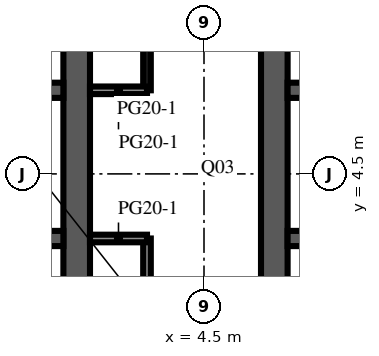
"""IFC4 building model, lengths in metres.
Left out: names, types, materials, properties, quantities, classifications, styles, units other than length and angle.
Written with IfcOpenShell. Run it as: python <this file> out.ifc"""

import sys

from ifc_helpers import new_model, si_unit, direction, frame, frame_2d, origin, place, context, subcontext, project, spatial, rectangle, extrude, element, fill, save


model = new_model("IFC4")
c1 = context("Model", 3, precision=1e-05, world=origin(), true_north=direction((0.0, 1.0)))
c2 = subcontext(c1, "Body", "Model", "MODEL_VIEW")
j1 = project(units=[si_unit("LENGTHUNIT", "METRE"), si_unit("PLANEANGLEUNIT", "RADIAN")], contexts=[c1])
p1 = place(None, origin())
s1 = spatial("IfcSite", under=j1, at=p1, CompositionType="ELEMENT")
p2 = place(p1, origin())
s2 = spatial("IfcBuilding", under=s1, at=p2, CompositionType="ELEMENT")
p3 = place(p2, frame((0.0, 0.0, 235.7)))
s3 = spatial("IfcBuildingStorey", under=s2, at=p3, CompositionType="ELEMENT", Elevation=235.7)
p4 = place(p3, frame((1.15, -9.0, 0.0), z_axis=(0.0, 0.0, 1.0), x_axis=(0.0, 1.0, 0.0)))
e1 = element("IfcWall", 1, at=p4, inside=s3, PredefinedType="SHEAR", context=c2, shape_type="SweptSolid", body=[
    extrude(rectangle(XDim=27.5, YDim=0.7, at=frame_2d((13.75, 0.0))), origin(), (0.0, 0.0, 1.0), 4.1),
])
p5 = place(p4, frame((12.55, 0.0, 0.0)))
e2 = element("IfcOpeningElement", 2, at=p5, cuts=e1, PredefinedType="OPENING", context=c2, shape_type="SweptSolid", body=[
    extrude(rectangle(XDim=2.4, YDim=2.4, at=frame_2d((1.2, 1.2))), frame((0.0, 0.36, 0.0), z_axis=(0.0, -1.0, 0.0), x_axis=(1.0, 0.0, 0.0)), (0.0, 0.0, 1.0), 0.72),
])
p6 = place(p4, frame((5.42, 0.0, 0.0)))
e3 = element("IfcOpeningElement", 3, at=p6, cuts=e1, PredefinedType="OPENING", context=c2, shape_type="SweptSolid", body=[
    extrude(rectangle(XDim=1.2, YDim=2.1, at=frame_2d((0.6, 1.05))), frame((0.0, 0.36, 0.0), z_axis=(0.0, -1.0, 0.0), x_axis=(1.0, 0.0, 0.0)), (0.0, 0.0, 1.0), 0.72),
])
p7 = place(p4, frame((19.46, 0.0, 0.0)))
e4 = element("IfcOpeningElement", 4, at=p7, cuts=e1, PredefinedType="OPENING", context=c2, shape_type="SweptSolid", body=[
    extrude(rectangle(XDim=1.0, YDim=2.1, at=frame_2d((0.5, 1.05))), frame((0.0, 0.36, 0.0), z_axis=(0.0, -1.0, 0.0), x_axis=(1.0, 0.0, 0.0)), (0.0, 0.0, 1.0), 0.72),
])
p8 = place(p4, frame((21.17, 0.0, 0.0)))
e5 = element("IfcOpeningElement", 5, at=p8, cuts=e1, PredefinedType="OPENING", context=c2, shape_type="SweptSolid", body=[
    extrude(rectangle(XDim=1.0, YDim=2.1, at=frame_2d((0.5, 1.05))), frame((0.0, 0.36, 0.0), z_axis=(0.0, -1.0, 0.0), x_axis=(1.0, 0.0, 0.0)), (0.0, 0.0, 1.0), 0.72),
])
p9 = place(p4, frame((23.26, 0.0, 0.0)))
e6 = element("IfcOpeningElement", 6, at=p9, cuts=e1, PredefinedType="OPENING", context=c2, shape_type="SweptSolid", body=[
    extrude(rectangle(XDim=1.0, YDim=2.1, at=frame_2d((0.5, 1.05))), frame((0.0, 0.36, 0.0), z_axis=(0.0, -1.0, 0.0), x_axis=(1.0, 0.0, 0.0)), (0.0, 0.0, 1.0), 0.72),
])
p10 = place(p4, frame((25.35, 0.0, 0.0)))
e7 = element("IfcOpeningElement", 7, at=p10, cuts=e1, PredefinedType="OPENING", context=c2, shape_type="SweptSolid", body=[
    extrude(rectangle(XDim=1.0, YDim=2.1, at=frame_2d((0.5, 1.05))), frame((0.0, 0.36, 0.0), z_axis=(0.0, -1.0, 0.0), x_axis=(1.0, 0.0, 0.0)), (0.0, 0.0, 1.0), 0.72),
])
p11 = place(p3, frame((-9.8, 2.8, 0.0), z_axis=(0.0, 0.0, 1.0), x_axis=(1.0, 0.0, 0.0)))
e8 = element("IfcWall", 8, at=p11, inside=s3, PredefinedType="SHEAR", context=c2, shape_type="SweptSolid", body=[
    extrude(rectangle(XDim=10.6, YDim=0.4, at=frame_2d((5.3, 0.0))), origin(), (0.0, 0.0, 1.0), 4.1),
])
p12 = place(p11, frame((0.688, 0.0, 0.0)))
e9 = element("IfcOpeningElement", 9, at=p12, cuts=e8, PredefinedType="OPENING", context=c2, shape_type="SweptSolid", body=[
    extrude(rectangle(XDim=1.1, YDim=2.1, at=frame_2d((0.55, 1.05))), frame((0.0, 0.21, 0.0), z_axis=(0.0, -1.0, 0.0), x_axis=(1.0, 0.0, 0.0)), (0.0, 0.0, 1.0), 0.42),
])
p13 = place(p11, frame((3.438, 0.0, 0.0)))
e10 = element("IfcOpeningElement", 10, at=p13, cuts=e8, PredefinedType="OPENING", context=c2, shape_type="SweptSolid", body=[
    extrude(rectangle(XDim=1.1, YDim=2.1, at=frame_2d((0.55, 1.05))), frame((0.0, 0.21, 0.0), z_axis=(0.0, -1.0, 0.0), x_axis=(1.0, 0.0, 0.0)), (0.0, 0.0, 1.0), 0.42),
])
p14 = place(p11, frame((6.113, 0.0, 0.0)))
e11 = element("IfcOpeningElement", 11, at=p14, cuts=e8, PredefinedType="OPENING", context=c2, shape_type="SweptSolid", body=[
    extrude(rectangle(XDim=1.0, YDim=2.1, at=frame_2d((0.5, 1.05))), frame((0.0, 0.21, 0.0), z_axis=(0.0, -1.0, 0.0), x_axis=(1.0, 0.0, 0.0)), (0.0, 0.0, 1.0), 0.42),
])
p15 = place(p11, frame((8.863, 0.0, 0.0)))
e12 = element("IfcOpeningElement", 12, at=p15, cuts=e8, PredefinedType="OPENING", context=c2, shape_type="SweptSolid", body=[
    extrude(rectangle(XDim=1.0, YDim=2.1, at=frame_2d((0.5, 1.05))), frame((0.0, 0.21, 0.0), z_axis=(0.0, -1.0, 0.0), x_axis=(1.0, 0.0, 0.0)), (0.0, 0.0, 1.0), 0.42),
])
p16 = place(p3, frame((-9.8, 6.7, 0.0), z_axis=(0.0, 0.0, 1.0), x_axis=(1.0, 0.0, 0.0)))
e13 = element("IfcWall", 13, at=p16, inside=s3, PredefinedType="SHEAR", context=c2, shape_type="SweptSolid", body=[
    extrude(rectangle(XDim=10.6, YDim=0.4, at=frame_2d((5.3, 0.0))), origin(), (0.0, 0.0, 1.0), 4.1),
])
p17 = place(p16, frame((3.438, 0.0, 0.0)))
e14 = element("IfcOpeningElement", 14, at=p17, cuts=e13, PredefinedType="OPENING", context=c2, shape_type="SweptSolid", body=[
    extrude(rectangle(XDim=1.1, YDim=2.1, at=frame_2d((0.55, 1.05))), frame((0.0, 0.21, 0.0), z_axis=(0.0, -1.0, 0.0), x_axis=(1.0, 0.0, 0.0)), (0.0, 0.0, 1.0), 0.42),
])
p18 = place(p16, frame((6.062, 0.0, 0.0)))
e15 = element("IfcOpeningElement", 15, at=p18, cuts=e13, PredefinedType="OPENING", context=c2, shape_type="SweptSolid", body=[
    extrude(rectangle(XDim=1.1, YDim=2.1, at=frame_2d((0.55, 1.05))), frame((0.0, 0.21, 0.0), z_axis=(0.0, -1.0, 0.0), x_axis=(1.0, 0.0, 0.0)), (0.0, 0.0, 1.0), 0.42),
])
p19 = place(p16, frame((8.812, 0.0, 0.0)))
e16 = element("IfcOpeningElement", 16, at=p19, cuts=e13, PredefinedType="OPENING", context=c2, shape_type="SweptSolid", body=[
    extrude(rectangle(XDim=1.1, YDim=2.1, at=frame_2d((0.55, 1.05))), frame((0.0, 0.21, 0.0), z_axis=(0.0, -1.0, 0.0), x_axis=(1.0, 0.0, 0.0)), (0.0, 0.0, 1.0), 0.42),
])
p20 = place(p16, frame((0.738, 0.0, 0.0)))
e17 = element("IfcOpeningElement", 17, at=p20, cuts=e13, PredefinedType="OPENING", context=c2, shape_type="SweptSolid", body=[
    extrude(rectangle(XDim=1.0, YDim=2.1, at=frame_2d((0.5, 1.05))), frame((0.0, 0.21, 0.0), z_axis=(0.0, -1.0, 0.0), x_axis=(1.0, 0.0, 0.0)), (0.0, 0.0, 1.0), 0.42),
])
p21 = place(p3, frame((6.35, -9.0, 0.0), z_axis=(0.0, 0.0, 1.0), x_axis=(0.0, 1.0, 0.0)))
e18 = element("IfcWall", 18, at=p21, inside=s3, PredefinedType="SHEAR", context=c2, shape_type="SweptSolid", body=[
    extrude(rectangle(XDim=27.5, YDim=0.7, at=frame_2d((13.75, 0.0))), origin(), (0.0, 0.0, 1.0), 4.1),
])
p22 = place(p21, frame((12.55, 0.0, 0.0)))
e19 = element("IfcOpeningElement", 19, at=p22, cuts=e18, PredefinedType="OPENING", context=c2, shape_type="SweptSolid", body=[
    extrude(rectangle(XDim=2.4, YDim=2.4, at=frame_2d((1.2, 1.2))), frame((0.0, 0.36, 0.0), z_axis=(0.0, -1.0, 0.0), x_axis=(1.0, 0.0, 0.0)), (0.0, 0.0, 1.0), 0.72),
])
p23 = place(p21, frame((5.42, 0.0, 0.0)))
e20 = element("IfcOpeningElement", 20, at=p23, cuts=e18, PredefinedType="OPENING", context=c2, shape_type="SweptSolid", body=[
    extrude(rectangle(XDim=1.2, YDim=2.1, at=frame_2d((0.6, 1.05))), frame((0.0, 0.36, 0.0), z_axis=(0.0, -1.0, 0.0), x_axis=(1.0, 0.0, 0.0)), (0.0, 0.0, 1.0), 0.72),
])
p24 = place(p21, frame((19.46, 0.0, 0.0)))
e21 = element("IfcOpeningElement", 21, at=p24, cuts=e18, PredefinedType="OPENING", context=c2, shape_type="SweptSolid", body=[
    extrude(rectangle(XDim=1.0, YDim=2.1, at=frame_2d((0.5, 1.05))), frame((0.0, 0.36, 0.0), z_axis=(0.0, -1.0, 0.0), x_axis=(1.0, 0.0, 0.0)), (0.0, 0.0, 1.0), 0.72),
])
p25 = place(p21, frame((21.17, 0.0, 0.0)))
e22 = element("IfcOpeningElement", 22, at=p25, cuts=e18, PredefinedType="OPENING", context=c2, shape_type="SweptSolid", body=[
    extrude(rectangle(XDim=1.0, YDim=2.1, at=frame_2d((0.5, 1.05))), frame((0.0, 0.36, 0.0), z_axis=(0.0, -1.0, 0.0), x_axis=(1.0, 0.0, 0.0)), (0.0, 0.0, 1.0), 0.72),
])
p26 = place(p21, frame((23.26, 0.0, 0.0)))
e23 = element("IfcOpeningElement", 23, at=p26, cuts=e18, PredefinedType="OPENING", context=c2, shape_type="SweptSolid", body=[
    extrude(rectangle(XDim=1.0, YDim=2.1, at=frame_2d((0.5, 1.05))), frame((0.0, 0.36, 0.0), z_axis=(0.0, -1.0, 0.0), x_axis=(1.0, 0.0, 0.0)), (0.0, 0.0, 1.0), 0.72),
])
p27 = place(p21, frame((25.35, 0.0, 0.0)))
e24 = element("IfcOpeningElement", 24, at=p27, cuts=e18, PredefinedType="OPENING", context=c2, shape_type="SweptSolid", body=[
    extrude(rectangle(XDim=1.0, YDim=2.1, at=frame_2d((0.5, 1.05))), frame((0.0, 0.36, 0.0), z_axis=(0.0, -1.0, 0.0), x_axis=(1.0, 0.0, 0.0)), (0.0, 0.0, 1.0), 0.72),
])
p28 = place(p3, frame((6.7, 2.8, 0.0), z_axis=(0.0, 0.0, 1.0), x_axis=(1.0, 0.0, 0.0)))
e25 = element("IfcWall", 25, at=p28, inside=s3, PredefinedType="SHEAR", context=c2, shape_type="SweptSolid", body=[
    extrude(rectangle(XDim=10.6, YDim=0.4, at=frame_2d((5.3, 0.0))), origin(), (0.0, 0.0, 1.0), 4.1),
])
p29 = place(p28, frame((0.688, 0.0, 0.0)))
e26 = element("IfcOpeningElement", 26, at=p29, cuts=e25, PredefinedType="OPENING", context=c2, shape_type="SweptSolid", body=[
    extrude(rectangle(XDim=1.1, YDim=2.1, at=frame_2d((0.55, 1.05))), frame((0.0, 0.21, 0.0), z_axis=(0.0, -1.0, 0.0), x_axis=(1.0, 0.0, 0.0)), (0.0, 0.0, 1.0), 0.42),
])
p30 = place(p28, frame((3.438, 0.0, 0.0)))
e27 = element("IfcOpeningElement", 27, at=p30, cuts=e25, PredefinedType="OPENING", context=c2, shape_type="SweptSolid", body=[
    extrude(rectangle(XDim=1.1, YDim=2.1, at=frame_2d((0.55, 1.05))), frame((0.0, 0.21, 0.0), z_axis=(0.0, -1.0, 0.0), x_axis=(1.0, 0.0, 0.0)), (0.0, 0.0, 1.0), 0.42),
])
p31 = place(p28, frame((6.113, 0.0, 0.0)))
e28 = element("IfcOpeningElement", 28, at=p31, cuts=e25, PredefinedType="OPENING", context=c2, shape_type="SweptSolid", body=[
    extrude(rectangle(XDim=1.0, YDim=2.1, at=frame_2d((0.5, 1.05))), frame((0.0, 0.21, 0.0), z_axis=(0.0, -1.0, 0.0), x_axis=(1.0, 0.0, 0.0)), (0.0, 0.0, 1.0), 0.42),
])
p32 = place(p28, frame((8.863, 0.0, 0.0)))
e29 = element("IfcOpeningElement", 29, at=p32, cuts=e25, PredefinedType="OPENING", context=c2, shape_type="SweptSolid", body=[
    extrude(rectangle(XDim=1.0, YDim=2.1, at=frame_2d((0.5, 1.05))), frame((0.0, 0.21, 0.0), z_axis=(0.0, -1.0, 0.0), x_axis=(1.0, 0.0, 0.0)), (0.0, 0.0, 1.0), 0.42),
])
p33 = place(p3, frame((6.7, 6.7, 0.0), z_axis=(0.0, 0.0, 1.0), x_axis=(1.0, 0.0, 0.0)))
e30 = element("IfcWall", 30, at=p33, inside=s3, PredefinedType="SHEAR", context=c2, shape_type="SweptSolid", body=[
    extrude(rectangle(XDim=10.6, YDim=0.4, at=frame_2d((5.3, 0.0))), origin(), (0.0, 0.0, 1.0), 4.1),
])
p34 = place(p33, frame((3.438, 0.0, 0.0)))
e31 = element("IfcOpeningElement", 31, at=p34, cuts=e30, PredefinedType="OPENING", context=c2, shape_type="SweptSolid", body=[
    extrude(rectangle(XDim=1.1, YDim=2.1, at=frame_2d((0.55, 1.05))), frame((0.0, 0.21, 0.0), z_axis=(0.0, -1.0, 0.0), x_axis=(1.0, 0.0, 0.0)), (0.0, 0.0, 1.0), 0.42),
])
p35 = place(p33, frame((6.062, 0.0, 0.0)))
e32 = element("IfcOpeningElement", 32, at=p35, cuts=e30, PredefinedType="OPENING", context=c2, shape_type="SweptSolid", body=[
    extrude(rectangle(XDim=1.1, YDim=2.1, at=frame_2d((0.55, 1.05))), frame((0.0, 0.21, 0.0), z_axis=(0.0, -1.0, 0.0), x_axis=(1.0, 0.0, 0.0)), (0.0, 0.0, 1.0), 0.42),
])
p36 = place(p33, frame((8.812, 0.0, 0.0)))
e33 = element("IfcOpeningElement", 33, at=p36, cuts=e30, PredefinedType="OPENING", context=c2, shape_type="SweptSolid", body=[
    extrude(rectangle(XDim=1.1, YDim=2.1, at=frame_2d((0.55, 1.05))), frame((0.0, 0.21, 0.0), z_axis=(0.0, -1.0, 0.0), x_axis=(1.0, 0.0, 0.0)), (0.0, 0.0, 1.0), 0.42),
])
p37 = place(p33, frame((0.738, 0.0, 0.0)))
e34 = element("IfcOpeningElement", 34, at=p37, cuts=e30, PredefinedType="OPENING", context=c2, shape_type="SweptSolid", body=[
    extrude(rectangle(XDim=1.0, YDim=2.1, at=frame_2d((0.5, 1.05))), frame((0.0, 0.21, 0.0), z_axis=(0.0, -1.0, 0.0), x_axis=(1.0, 0.0, 0.0)), (0.0, 0.0, 1.0), 0.42),
])
p38 = place(p3, frame((3.0, -2.0, 0.0), z_axis=(0.0, 0.0, 1.0), x_axis=(0.0, 1.0, 0.0)))
e35 = element("IfcWall", 35, at=p38, inside=s3, PredefinedType="PARTITIONING", context=c2, shape_type="SweptSolid", body=[
    extrude(rectangle(XDim=4.8, YDim=0.2, at=frame_2d((2.4, 0.0))), origin(), (0.0, 0.0, 1.0), 3.65),
])
p39 = place(p38, frame((2.35, 0.0, 0.0)))
e36 = element("IfcOpeningElement", 36, at=p39, cuts=e35, PredefinedType="OPENING", context=c2, shape_type="SweptSolid", body=[
    extrude(rectangle(XDim=1.0, YDim=2.1, at=frame_2d((0.5, 1.05))), frame((0.0, 0.11, 0.0), z_axis=(0.0, -1.0, 0.0), x_axis=(1.0, 0.0, 0.0)), (0.0, 0.0, 1.0), 0.22),
])
p40 = place(p3, frame((3.0, 6.7, 0.0), z_axis=(0.0, 0.0, 1.0), x_axis=(0.0, 1.0, 0.0)))
e37 = element("IfcWall", 37, at=p40, inside=s3, PredefinedType="PARTITIONING", context=c2, shape_type="SweptSolid", body=[
    extrude(rectangle(XDim=11.8, YDim=0.2, at=frame_2d((5.9, 0.0))), origin(), (0.0, 0.0, 1.0), 3.65),
])
p41 = place(p40, frame((6.6, 0.0, 0.0)))
e38 = element("IfcOpeningElement", 38, at=p41, cuts=e37, PredefinedType="OPENING", context=c2, shape_type="SweptSolid", body=[
    extrude(rectangle(XDim=1.0, YDim=2.1, at=frame_2d((0.5, 1.05))), frame((0.0, 0.11, 0.0), z_axis=(0.0, -1.0, 0.0), x_axis=(1.0, 0.0, 0.0)), (0.0, 0.0, 1.0), 0.22),
])
for number, where, z_axis, x_axis in (
    (39, (1.5, 2.8, 0.0), (0.0, 0.0, 1.0), (1.0, 0.0, 0.0)),
    (40, (1.5, 6.7, 0.0), (0.0, 0.0, 1.0), (1.0, 0.0, 0.0)),
):
    element("IfcWall", number, at=place(p3, frame(where, z_axis=z_axis, x_axis=x_axis)), inside=s3, PredefinedType="PARTITIONING", context=c2, shape_type="SweptSolid", body=[
        extrude(rectangle(XDim=1.5, YDim=0.2, at=frame_2d((0.75, 0.0))), origin(), (0.0, 0.0, 1.0), 3.65),
    ])
p42 = place(p5, origin())
e41 = element("IfcDoor", 41, at=p42, inside=s3, OperationType="DOUBLE_DOOR_DOUBLE_SWING", PredefinedType="DOOR", context=c2, shape_type="SweptSolid", body=[
    extrude(rectangle(XDim=2.4, YDim=2.4, at=frame_2d((1.2, 1.2))), frame((0.0, 0.025, 0.0), z_axis=(0.0, -1.0, 0.0), x_axis=(1.0, 0.0, 0.0)), (0.0, 0.0, 1.0), 0.05),
])
fill(e2, e41)
p43 = place(p22, origin())
e42 = element("IfcDoor", 42, at=p43, inside=s3, OperationType="DOUBLE_DOOR_DOUBLE_SWING", PredefinedType="DOOR", context=c2, shape_type="SweptSolid", body=[
    extrude(rectangle(XDim=2.4, YDim=2.4, at=frame_2d((1.2, 1.2))), frame((0.0, 0.025, 0.0), z_axis=(0.0, -1.0, 0.0), x_axis=(1.0, 0.0, 0.0)), (0.0, 0.0, 1.0), 0.05),
])
fill(e19, e42)
save(model, sys.argv[1])
